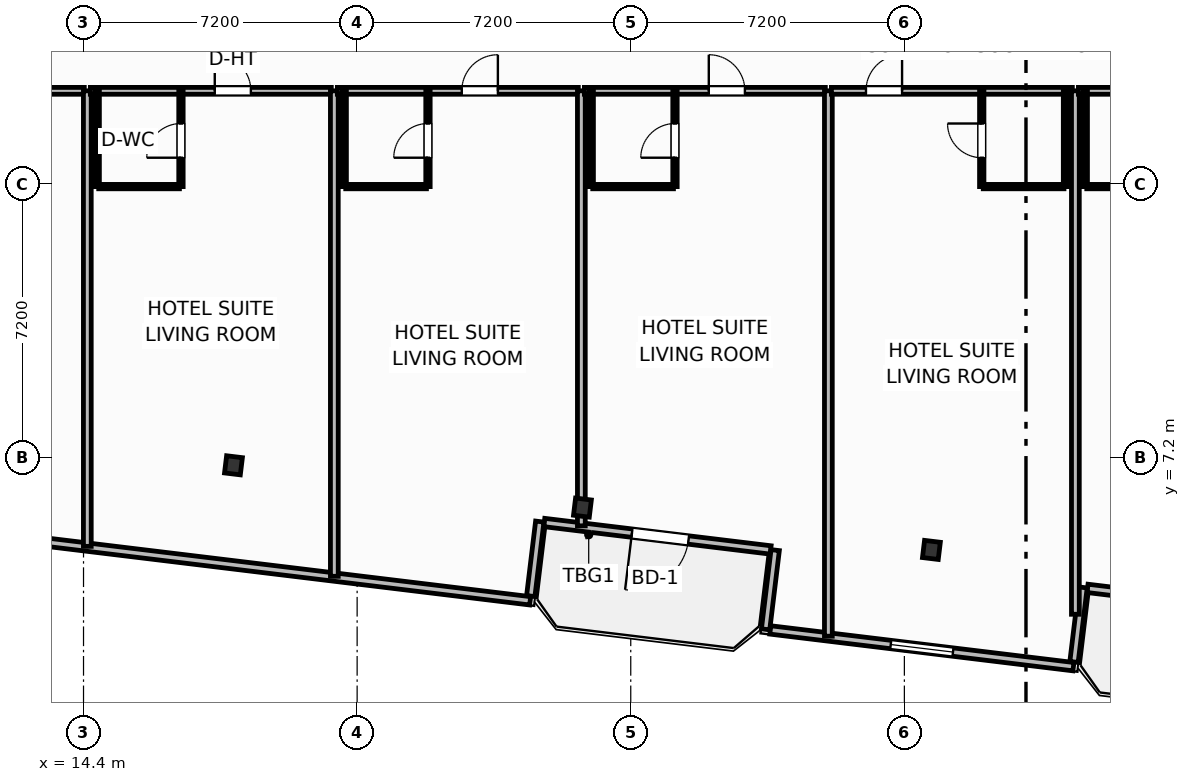
"""IFC4 building model, lengths in metres.
Left out: names, types, materials, properties, quantities, classifications, styles, units other than length and angle.
Written with IfcOpenShell. Run it as: python <this file> out.ifc"""

import sys

from ifc_helpers import new_model, si_unit, direction, frame, frame_2d, origin, origin_2d, place, context, subcontext, project, spatial, rectangle, i_section, extrude, element, fill, save


model = new_model("IFC4")
c1 = context("Model", 3, precision=1e-05, world=origin(), true_north=direction((0.0, 1.0)))
c2 = subcontext(c1, "Body", "Model", "MODEL_VIEW")
j1 = project(units=[si_unit("LENGTHUNIT", "METRE"), si_unit("PLANEANGLEUNIT", "RADIAN")], contexts=[c1])
p1 = place(None, origin())
s1 = spatial("IfcSite", under=j1, at=p1, CompositionType="ELEMENT")
p2 = place(p1, origin())
s2 = spatial("IfcBuilding", under=s1, at=p2, CompositionType="ELEMENT")
p3 = place(p2, frame((0.0, 0.0, 129.1)))
s3 = spatial("IfcBuildingStorey", under=s2, at=p3, CompositionType="ELEMENT", Elevation=129.1)
for number, where, z_axis, x_axis in (
    (1, (18.346, 6.997, 0.0), (0.0, 0.0, 1.0), (0.993, -0.12, 0.0)),
    (2, (27.529, 5.884, 0.0), (0.0, 0.0, 1.0), (0.993, -0.12, 0.0)),
    (3, (36.711, 4.77, 0.0), (0.0, 0.0, 1.0), (0.993, -0.12, 0.0)),
):
    element("IfcColumn", number, at=place(p3, frame(where, z_axis=z_axis, x_axis=x_axis)), inside=s3, PredefinedType="COLUMN", context=c2, shape_type="SweptSolid", body=[
        extrude(i_section(OverallWidth=0.418, OverallDepth=0.455, WebThickness=0.042, FlangeThickness=0.068, FilletRadius=0.025, at=origin_2d()), origin(), (0.0, 0.0, 1.0), 3.7),
    ])
p4 = place(p3, frame((32.48, 4.77, 0.0), z_axis=(0.0, 0.0, 1.0), x_axis=(-0.992735402148, 0.120318000826, 0.0)))
e4 = element("IfcWall", 4, at=p4, inside=s3, PredefinedType="SOLIDWALL", context=c2, shape_type="SweptSolid", body=[
    extrude(rectangle(XDim=6.0, YDim=0.22, at=frame_2d((3.0, 0.0))), origin(), (0.0, 0.0, 1.0), 2.73),
])
p5 = place(p4, frame((2.176, 0.0, 0.0)))
e5 = element("IfcOpeningElement", 5, at=p5, cuts=e4, PredefinedType="OPENING", context=c2, shape_type="SweptSolid", body=[
    extrude(rectangle(XDim=1.5, YDim=2.25, at=frame_2d((0.75, 1.125))), frame((0.0, 0.12, 0.0), z_axis=(0.0, -1.0, 0.0), x_axis=(1.0, 0.0, 0.0)), (0.0, 0.0, 1.0), 0.24),
])
p6 = place(p3, frame((46.776, 3.037, 0.0), z_axis=(0.0, 0.0, 1.0), x_axis=(-0.992735402148, 0.120318000826, 0.0)))
e6 = element("IfcWall", 6, at=p6, inside=s3, PredefinedType="SOLIDWALL", context=c2, shape_type="SweptSolid", body=[
    extrude(rectangle(XDim=6.0, YDim=0.22, at=frame_2d((3.0, 0.0))), origin(), (0.0, 0.0, 1.0), 2.73),
])
p7 = place(p6, frame((2.176, 0.0, 0.0)))
e7 = element("IfcOpeningElement", 7, at=p7, cuts=e6, PredefinedType="OPENING", context=c2, shape_type="SweptSolid", body=[
    extrude(rectangle(XDim=1.5, YDim=2.25, at=frame_2d((0.75, 1.125))), frame((0.0, 0.12, 0.0), z_axis=(0.0, -1.0, 0.0), x_axis=(1.0, 0.0, 0.0)), (0.0, 0.0, 1.0), 0.24),
])
p8 = place(p3, frame((4.862, 6.012, 0.0), z_axis=(0.0, 0.0, 1.0), x_axis=(0.99273213367, -0.120344965739, 0.0)))
e8 = element("IfcWall", 8, at=p8, inside=s3, PredefinedType="SOLIDWALL", context=c2, shape_type="SweptSolid", body=[
    extrude(rectangle(XDim=21.447, YDim=0.22, at=frame_2d((10.724, 0.0))), origin(), (0.0, 0.0, 1.0), 2.73),
])
p9 = place(p8, frame((5.543, 0.0, 0.8)))
e9 = element("IfcOpeningElement", 9, at=p9, cuts=e8, PredefinedType="OPENING", context=c2, shape_type="SweptSolid", body=[
    extrude(rectangle(XDim=1.65, YDim=1.65, at=frame_2d((0.825, 0.825))), frame((0.0, 0.12, 0.0), z_axis=(0.0, -1.0, 0.0), x_axis=(1.0, 0.0, 0.0)), (0.0, 0.0, 1.0), 0.24),
])
p10 = place(p3, frame((26.168, 3.555, 0.0), z_axis=(0.0, 0.0, 1.0), x_axis=(0.120290754542, 0.992738703976, 0.0)))
e10 = element("IfcWall", 10, at=p10, inside=s3, PredefinedType="SOLIDWALL", context=c2, shape_type="SweptSolid", body=[
    extrude(rectangle(XDim=1.975, YDim=0.22, at=frame_2d((0.987, 0.0))), origin(), (0.0, 0.0, 1.0), 2.73),
])
p11 = place(p3, frame((32.601, 4.765, 0.0), z_axis=(0.0, 0.0, 1.0), x_axis=(-0.120327895535, -0.992734202874, 0.0)))
e11 = element("IfcWall", 11, at=p11, inside=s3, PredefinedType="SOLIDWALL", context=c2, shape_type="SweptSolid", body=[
    extrude(rectangle(XDim=2.1, YDim=0.22, at=frame_2d((1.05, 0.0))), origin(), (0.0, 0.0, 1.0), 2.73),
])
p12 = place(p3, frame((32.472, 2.665, 0.0), z_axis=(0.0, 0.0, 1.0), x_axis=(0.992734661931, -0.120324108143, 0.0)))
e12 = element("IfcWall", 12, at=p12, inside=s3, PredefinedType="SOLIDWALL", context=c2, shape_type="SweptSolid", body=[
    extrude(rectangle(XDim=8.035, YDim=0.22, at=frame_2d((4.018, 0.0))), origin(), (0.0, 0.0, 1.0), 2.73),
])
p13 = place(p12, frame((3.192, 0.0, 0.8)))
e13 = element("IfcOpeningElement", 13, at=p13, cuts=e12, PredefinedType="OPENING", context=c2, shape_type="SweptSolid", body=[
    extrude(rectangle(XDim=1.65, YDim=1.65, at=frame_2d((0.825, 0.825))), frame((0.0, 0.12, 0.0), z_axis=(0.0, -1.0, 0.0), x_axis=(1.0, 0.0, 0.0)), (0.0, 0.0, 1.0), 0.24),
])
p14 = place(p3, frame((40.464, 1.822, 0.0), z_axis=(0.0, 0.0, 1.0), x_axis=(0.120275992932, 0.992740492538, 0.0)))
e14 = element("IfcWall", 14, at=p14, inside=s3, PredefinedType="SOLIDWALL", context=c2, shape_type="SweptSolid", body=[
    extrude(rectangle(XDim=1.975, YDim=0.22, at=frame_2d((0.988, 0.0))), origin(), (0.0, 0.0, 1.0), 2.73),
])
p15 = place(p3, frame((0.884, 16.85, 0.0), z_axis=(0.0, 0.0, 1.0), x_axis=(1.0, 0.0, 0.0)))
e15 = element("IfcWall", 15, at=p15, inside=s3, PredefinedType="PARTITIONING", context=c2, shape_type="SweptSolid", body=[
    extrude(rectangle(XDim=13.536, YDim=0.18, at=frame_2d((6.768, 0.0))), origin(), (0.0, 0.0, 1.0), 3.45),
])
p16 = place(p15, frame((11.591, 0.0, 0.0)))
e16 = element("IfcOpeningElement", 16, at=p16, cuts=e15, PredefinedType="OPENING", context=c2, shape_type="SweptSolid", body=[
    extrude(rectangle(XDim=0.95, YDim=2.05, at=frame_2d((0.475, 1.025))), frame((0.0, 0.1, 0.0), z_axis=(0.0, -1.0, 0.0), x_axis=(1.0, 0.0, 0.0)), (0.0, 0.0, 1.0), 0.2),
])
p17 = place(p3, frame((14.5, 4.864, 0.0), z_axis=(0.0, 0.0, 1.0), x_axis=(0.0, 1.0, 0.0)))
e17 = element("IfcWall", 17, at=p17, inside=s3, PredefinedType="PARTITIONING", context=c2, shape_type="SweptSolid", body=[
    extrude(rectangle(XDim=11.986, YDim=0.205, at=frame_2d((5.993, 0.0))), origin(), (0.0, 0.0, 1.0), 3.45),
])
p18 = place(p3, frame((14.58, 16.85, 0.0), z_axis=(0.0, 0.0, 1.0), x_axis=(1.0, 0.0, 0.0)))
e18 = element("IfcWall", 18, at=p18, inside=s3, PredefinedType="PARTITIONING", context=c2, shape_type="SweptSolid", body=[
    extrude(rectangle(XDim=6.34, YDim=0.18, at=frame_2d((3.17, 0.0))), origin(), (0.0, 0.0, 1.0), 3.45),
])
p19 = place(p18, frame((3.274, 0.0, 0.0)))
e19 = element("IfcOpeningElement", 19, at=p19, cuts=e18, PredefinedType="OPENING", context=c2, shape_type="SweptSolid", body=[
    extrude(rectangle(XDim=0.95, YDim=2.15, at=frame_2d((0.475, 1.075))), frame((0.0, 0.1, 0.0), z_axis=(0.0, -1.0, 0.0), x_axis=(1.0, 0.0, 0.0)), (0.0, 0.0, 1.0), 0.2),
])
p20 = place(p3, frame((14.8, 14.33, 0.0), z_axis=(0.0, 0.0, 1.0), x_axis=(1.0, 0.0, 0.0)))
e20 = element("IfcWall", 20, at=p20, inside=s3, PredefinedType="PARTITIONING", context=c2, shape_type="SweptSolid", body=[
    extrude(rectangle(XDim=2.124, YDim=0.115, at=frame_2d((1.062, 0.0))), origin(), (0.0, 0.0, 1.0), 3.45),
])
p21 = place(p3, frame((16.964, 14.33, 0.0), z_axis=(0.0, 0.0, 1.0), x_axis=(0.0, 1.0, 0.0)))
e21 = element("IfcWall", 21, at=p21, inside=s3, PredefinedType="PARTITIONING", context=c2, shape_type="SweptSolid", body=[
    extrude(rectangle(XDim=2.52, YDim=0.115, at=frame_2d((1.26, 0.0))), origin(), (0.0, 0.0, 1.0), 3.45),
])
p22 = place(p21, frame((0.76, 0.0, 0.0)))
e22 = element("IfcOpeningElement", 22, at=p22, cuts=e21, PredefinedType="OPENING", context=c2, shape_type="SweptSolid", body=[
    extrude(rectangle(XDim=0.9, YDim=2.05, at=frame_2d((0.45, 1.025))), frame((0.0, 0.067, 0.0), z_axis=(0.0, -1.0, 0.0), x_axis=(1.0, 0.0, 0.0)), (0.0, 0.0, 1.0), 0.135),
])
p23 = place(p3, frame((14.76, 14.33, 0.0), z_axis=(0.0, 0.0, 1.0), x_axis=(0.0, 1.0, 0.0)))
e23 = element("IfcWall", 23, at=p23, inside=s3, PredefinedType="PARTITIONING", context=c2, shape_type="SweptSolid", body=[
    extrude(rectangle(XDim=2.52, YDim=0.115, at=frame_2d((1.26, 0.0))), origin(), (0.0, 0.0, 1.0), 3.45),
])
p24 = place(p3, frame((21.0, 4.076, 0.0), z_axis=(0.0, 0.0, 1.0), x_axis=(0.0, 1.0, 0.0)))
e24 = element("IfcWall", 24, at=p24, inside=s3, PredefinedType="PARTITIONING", context=c2, shape_type="SweptSolid", body=[
    extrude(rectangle(XDim=12.774, YDim=0.205, at=frame_2d((6.387, 0.0))), origin(), (0.0, 0.0, 1.0), 3.45),
])
p25 = place(p3, frame((21.08, 16.85, 0.0), z_axis=(0.0, 0.0, 1.0), x_axis=(1.0, 0.0, 0.0)))
e25 = element("IfcWall", 25, at=p25, inside=s3, PredefinedType="PARTITIONING", context=c2, shape_type="SweptSolid", body=[
    extrude(rectangle(XDim=6.34, YDim=0.18, at=frame_2d((3.17, 0.0))), origin(), (0.0, 0.0, 1.0), 3.45),
])
p26 = place(p25, frame((3.274, 0.0, 0.0)))
e26 = element("IfcOpeningElement", 26, at=p26, cuts=e25, PredefinedType="OPENING", context=c2, shape_type="SweptSolid", body=[
    extrude(rectangle(XDim=0.95, YDim=2.15, at=frame_2d((0.475, 1.075))), frame((0.0, 0.1, 0.0), z_axis=(0.0, -1.0, 0.0), x_axis=(1.0, 0.0, 0.0)), (0.0, 0.0, 1.0), 0.2),
])
p27 = place(p3, frame((21.3, 14.33, 0.0), z_axis=(0.0, 0.0, 1.0), x_axis=(1.0, 0.0, 0.0)))
e27 = element("IfcWall", 27, at=p27, inside=s3, PredefinedType="PARTITIONING", context=c2, shape_type="SweptSolid", body=[
    extrude(rectangle(XDim=2.124, YDim=0.115, at=frame_2d((1.062, 0.0))), origin(), (0.0, 0.0, 1.0), 3.45),
])
p28 = place(p3, frame((23.464, 14.33, 0.0), z_axis=(0.0, 0.0, 1.0), x_axis=(0.0, 1.0, 0.0)))
e28 = element("IfcWall", 28, at=p28, inside=s3, PredefinedType="PARTITIONING", context=c2, shape_type="SweptSolid", body=[
    extrude(rectangle(XDim=2.52, YDim=0.115, at=frame_2d((1.26, 0.0))), origin(), (0.0, 0.0, 1.0), 3.45),
])
p29 = place(p28, frame((0.76, 0.0, 0.0)))
e29 = element("IfcOpeningElement", 29, at=p29, cuts=e28, PredefinedType="OPENING", context=c2, shape_type="SweptSolid", body=[
    extrude(rectangle(XDim=0.9, YDim=2.05, at=frame_2d((0.45, 1.025))), frame((0.0, 0.067, 0.0), z_axis=(0.0, -1.0, 0.0), x_axis=(1.0, 0.0, 0.0)), (0.0, 0.0, 1.0), 0.135),
])
p30 = place(p3, frame((21.26, 14.33, 0.0), z_axis=(0.0, 0.0, 1.0), x_axis=(0.0, 1.0, 0.0)))
e30 = element("IfcWall", 30, at=p30, inside=s3, PredefinedType="PARTITIONING", context=c2, shape_type="SweptSolid", body=[
    extrude(rectangle(XDim=2.52, YDim=0.115, at=frame_2d((1.26, 0.0))), origin(), (0.0, 0.0, 1.0), 3.45),
])
p31 = place(p3, frame((27.5, 5.403, 0.0), z_axis=(0.0, 0.0, 1.0), x_axis=(0.0, 1.0, 0.0)))
e31 = element("IfcWall", 31, at=p31, inside=s3, PredefinedType="PARTITIONING", context=c2, shape_type="SweptSolid", body=[
    extrude(rectangle(XDim=11.447, YDim=0.205, at=frame_2d((5.723, 0.0))), origin(), (0.0, 0.0, 1.0), 2.662),
])
p32 = place(p3, frame((27.58, 16.85, 0.0), z_axis=(0.0, 0.0, 1.0), x_axis=(1.0, 0.0, 0.0)))
e32 = element("IfcWall", 32, at=p32, inside=s3, PredefinedType="PARTITIONING", context=c2, shape_type="SweptSolid", body=[
    extrude(rectangle(XDim=6.34, YDim=0.18, at=frame_2d((3.17, 0.0))), origin(), (0.0, 0.0, 1.0), 3.45),
])
p33 = place(p32, frame((3.274, 0.0, 0.0)))
e33 = element("IfcOpeningElement", 33, at=p33, cuts=e32, PredefinedType="OPENING", context=c2, shape_type="SweptSolid", body=[
    extrude(rectangle(XDim=0.95, YDim=2.15, at=frame_2d((0.475, 1.075))), frame((0.0, 0.1, 0.0), z_axis=(0.0, -1.0, 0.0), x_axis=(1.0, 0.0, 0.0)), (0.0, 0.0, 1.0), 0.2),
])
p34 = place(p3, frame((27.8, 14.33, 0.0), z_axis=(0.0, 0.0, 1.0), x_axis=(1.0, 0.0, 0.0)))
e34 = element("IfcWall", 34, at=p34, inside=s3, PredefinedType="PARTITIONING", context=c2, shape_type="SweptSolid", body=[
    extrude(rectangle(XDim=2.124, YDim=0.115, at=frame_2d((1.062, 0.0))), origin(), (0.0, 0.0, 1.0), 3.45),
])
p35 = place(p3, frame((29.964, 14.33, 0.0), z_axis=(0.0, 0.0, 1.0), x_axis=(0.0, 1.0, 0.0)))
e35 = element("IfcWall", 35, at=p35, inside=s3, PredefinedType="PARTITIONING", context=c2, shape_type="SweptSolid", body=[
    extrude(rectangle(XDim=2.52, YDim=0.115, at=frame_2d((1.26, 0.0))), origin(), (0.0, 0.0, 1.0), 3.45),
])
p36 = place(p35, frame((0.76, 0.0, 0.0)))
e36 = element("IfcOpeningElement", 36, at=p36, cuts=e35, PredefinedType="OPENING", context=c2, shape_type="SweptSolid", body=[
    extrude(rectangle(XDim=0.9, YDim=2.05, at=frame_2d((0.45, 1.025))), frame((0.0, 0.067, 0.0), z_axis=(0.0, -1.0, 0.0), x_axis=(1.0, 0.0, 0.0)), (0.0, 0.0, 1.0), 0.135),
])
p37 = place(p3, frame((27.76, 14.33, 0.0), z_axis=(0.0, 0.0, 1.0), x_axis=(0.0, 1.0, 0.0)))
e37 = element("IfcWall", 37, at=p37, inside=s3, PredefinedType="PARTITIONING", context=c2, shape_type="SweptSolid", body=[
    extrude(rectangle(XDim=2.52, YDim=0.115, at=frame_2d((1.26, 0.0))), origin(), (0.0, 0.0, 1.0), 3.45),
])
p38 = place(p3, frame((34.0, 2.5, 0.0), z_axis=(0.0, 0.0, 1.0), x_axis=(0.0, 1.0, 0.0)))
e38 = element("IfcWall", 38, at=p38, inside=s3, PredefinedType="PARTITIONING", context=c2, shape_type="SweptSolid", body=[
    extrude(rectangle(XDim=14.35, YDim=0.205, at=frame_2d((7.175, 0.0))), origin(), (0.0, 0.0, 1.0), 3.45),
])
p39 = place(p3, frame((34.08, 16.85, 0.0), z_axis=(0.0, 0.0, 1.0), x_axis=(1.0, 0.0, 0.0)))
e39 = element("IfcWall", 39, at=p39, inside=s3, PredefinedType="PARTITIONING", context=c2, shape_type="SweptSolid", body=[
    extrude(rectangle(XDim=6.34, YDim=0.18, at=frame_2d((3.17, 0.0))), origin(), (0.0, 0.0, 1.0), 3.45),
])
p40 = place(p39, frame((0.91, 0.0, 0.0)))
e40 = element("IfcOpeningElement", 40, at=p40, cuts=e39, PredefinedType="OPENING", context=c2, shape_type="SweptSolid", body=[
    extrude(rectangle(XDim=0.95, YDim=2.15, at=frame_2d((0.475, 1.075))), frame((0.0, 0.1, 0.0), z_axis=(0.0, -1.0, 0.0), x_axis=(1.0, 0.0, 0.0)), (0.0, 0.0, 1.0), 0.2),
])
p41 = place(p3, frame((38.076, 14.33, 0.0), z_axis=(0.0, 0.0, 1.0), x_axis=(1.0, 0.0, 0.0)))
e41 = element("IfcWall", 41, at=p41, inside=s3, PredefinedType="PARTITIONING", context=c2, shape_type="SweptSolid", body=[
    extrude(rectangle(XDim=2.124, YDim=0.115, at=frame_2d((1.062, 0.0))), origin(), (0.0, 0.0, 1.0), 3.45),
])
p42 = place(p3, frame((38.036, 14.33, 0.0), z_axis=(0.0, 0.0, 1.0), x_axis=(0.0, 1.0, 0.0)))
e42 = element("IfcWall", 42, at=p42, inside=s3, PredefinedType="PARTITIONING", context=c2, shape_type="SweptSolid", body=[
    extrude(rectangle(XDim=2.52, YDim=0.115, at=frame_2d((1.26, 0.0))), origin(), (0.0, 0.0, 1.0), 3.45),
])
p43 = place(p42, frame((0.76, 0.0, 0.0)))
e43 = element("IfcOpeningElement", 43, at=p43, cuts=e42, PredefinedType="OPENING", context=c2, shape_type="SweptSolid", body=[
    extrude(rectangle(XDim=0.9, YDim=2.05, at=frame_2d((0.45, 1.025))), frame((0.0, 0.067, 0.0), z_axis=(0.0, -1.0, 0.0), x_axis=(1.0, 0.0, 0.0)), (0.0, 0.0, 1.0), 0.135),
])
p44 = place(p3, frame((40.24, 14.33, 0.0), z_axis=(0.0, 0.0, 1.0), x_axis=(0.0, 1.0, 0.0)))
e44 = element("IfcWall", 44, at=p44, inside=s3, PredefinedType="PARTITIONING", context=c2, shape_type="SweptSolid", body=[
    extrude(rectangle(XDim=2.52, YDim=0.115, at=frame_2d((1.26, 0.0))), origin(), (0.0, 0.0, 1.0), 3.45),
])
p45 = place(p3, frame((40.5, 3.077, 0.0), z_axis=(0.0, 0.0, 1.0), x_axis=(0.0, 1.0, 0.0)))
e45 = element("IfcWall", 45, at=p45, inside=s3, PredefinedType="PARTITIONING", context=c2, shape_type="SweptSolid", body=[
    extrude(rectangle(XDim=13.773, YDim=0.205, at=frame_2d((6.887, 0.0))), origin(), (0.0, 0.0, 1.0), 3.45),
])
p46 = place(p3, frame((40.58, 16.85, 0.0), z_axis=(0.0, 0.0, 1.0), x_axis=(1.0, 0.0, 0.0)))
e46 = element("IfcWall", 46, at=p46, inside=s3, PredefinedType="PARTITIONING", context=c2, shape_type="SweptSolid", body=[
    extrude(rectangle(XDim=6.34, YDim=0.18, at=frame_2d((3.17, 0.0))), origin(), (0.0, 0.0, 1.0), 3.45),
])
p47 = place(p46, frame((3.274, 0.0, 0.0)))
e47 = element("IfcOpeningElement", 47, at=p47, cuts=e46, PredefinedType="OPENING", context=c2, shape_type="SweptSolid", body=[
    extrude(rectangle(XDim=0.95, YDim=2.15, at=frame_2d((0.475, 1.075))), frame((0.0, 0.1, 0.0), z_axis=(0.0, -1.0, 0.0), x_axis=(1.0, 0.0, 0.0)), (0.0, 0.0, 1.0), 0.2),
])
p48 = place(p3, frame((40.8, 14.33, 0.0), z_axis=(0.0, 0.0, 1.0), x_axis=(1.0, 0.0, 0.0)))
e48 = element("IfcWall", 48, at=p48, inside=s3, PredefinedType="PARTITIONING", context=c2, shape_type="SweptSolid", body=[
    extrude(rectangle(XDim=2.124, YDim=0.115, at=frame_2d((1.062, 0.0))), origin(), (0.0, 0.0, 1.0), 3.45),
])
p49 = place(p3, frame((40.76, 14.33, 0.0), z_axis=(0.0, 0.0, 1.0), x_axis=(0.0, 1.0, 0.0)))
e49 = element("IfcWall", 49, at=p49, inside=s3, PredefinedType="PARTITIONING", context=c2, shape_type="SweptSolid", body=[
    extrude(rectangle(XDim=2.52, YDim=0.115, at=frame_2d((1.26, 0.0))), origin(), (0.0, 0.0, 1.0), 3.45),
])
p50 = place(p5, origin())
e50 = element("IfcDoor", 50, at=p50, inside=s3, OperationType="SINGLE_SWING_RIGHT", PredefinedType="DOOR", context=c2, shape_type="SweptSolid", body=[
    extrude(rectangle(XDim=1.5, YDim=2.25, at=frame_2d((0.75, 1.125))), frame((0.0, 0.025, 0.0), z_axis=(0.0, -1.0, 0.0), x_axis=(1.0, 0.0, 0.0)), (0.0, 0.0, 1.0), 0.05),
])
fill(e5, e50)
p51 = place(p13, origin())
e51 = element("IfcWindow", 51, at=p51, inside=s3, PartitioningType="SINGLE_PANEL", PredefinedType="WINDOW", context=c2, shape_type="SweptSolid", body=[
    extrude(rectangle(XDim=1.65, YDim=1.65, at=frame_2d((0.825, 0.825))), frame((0.0, 0.03, 0.0), z_axis=(0.0, -1.0, 0.0), x_axis=(1.0, 0.0, 0.0)), (0.0, 0.0, 1.0), 0.06),
])
fill(e13, e51)
p52 = place(p19, origin())
e52 = element("IfcDoor", 52, at=p52, inside=s3, OperationType="SINGLE_SWING_LEFT", PredefinedType="DOOR", context=c2, shape_type="SweptSolid", body=[
    extrude(rectangle(XDim=0.95, YDim=2.15, at=frame_2d((0.475, 1.075))), frame((0.0, 0.025, 0.0), z_axis=(0.0, -1.0, 0.0), x_axis=(1.0, 0.0, 0.0)), (0.0, 0.0, 1.0), 0.05),
])
fill(e19, e52)
p53 = place(p22, origin())
e53 = element("IfcDoor", 53, at=p53, inside=s3, OperationType="SINGLE_SWING_LEFT", PredefinedType="DOOR", context=c2, shape_type="SweptSolid", body=[
    extrude(rectangle(XDim=0.9, YDim=2.05, at=frame_2d((0.45, 1.025))), frame((0.0, 0.025, 0.0), z_axis=(0.0, -1.0, 0.0), x_axis=(1.0, 0.0, 0.0)), (0.0, 0.0, 1.0), 0.05),
])
fill(e22, e53)
p54 = place(p26, origin())
e54 = element("IfcDoor", 54, at=p54, inside=s3, OperationType="SINGLE_SWING_RIGHT", PredefinedType="DOOR", context=c2, shape_type="SweptSolid", body=[
    extrude(rectangle(XDim=0.95, YDim=2.15, at=frame_2d((0.475, 1.075))), frame((0.0, 0.025, 0.0), z_axis=(0.0, -1.0, 0.0), x_axis=(1.0, 0.0, 0.0)), (0.0, 0.0, 1.0), 0.05),
])
fill(e26, e54)
p55 = place(p29, origin())
e55 = element("IfcDoor", 55, at=p55, inside=s3, OperationType="SINGLE_SWING_LEFT", PredefinedType="DOOR", context=c2, shape_type="SweptSolid", body=[
    extrude(rectangle(XDim=0.9, YDim=2.05, at=frame_2d((0.45, 1.025))), frame((0.0, 0.025, 0.0), z_axis=(0.0, -1.0, 0.0), x_axis=(1.0, 0.0, 0.0)), (0.0, 0.0, 1.0), 0.05),
])
fill(e29, e55)
p56 = place(p33, origin())
e56 = element("IfcDoor", 56, at=p56, inside=s3, OperationType="SINGLE_SWING_LEFT", PredefinedType="DOOR", context=c2, shape_type="SweptSolid", body=[
    extrude(rectangle(XDim=0.95, YDim=2.15, at=frame_2d((0.475, 1.075))), frame((0.0, 0.025, 0.0), z_axis=(0.0, -1.0, 0.0), x_axis=(1.0, 0.0, 0.0)), (0.0, 0.0, 1.0), 0.05),
])
fill(e33, e56)
p57 = place(p36, origin())
e57 = element("IfcDoor", 57, at=p57, inside=s3, OperationType="SINGLE_SWING_LEFT", PredefinedType="DOOR", context=c2, shape_type="SweptSolid", body=[
    extrude(rectangle(XDim=0.9, YDim=2.05, at=frame_2d((0.45, 1.025))), frame((0.0, 0.025, 0.0), z_axis=(0.0, -1.0, 0.0), x_axis=(1.0, 0.0, 0.0)), (0.0, 0.0, 1.0), 0.05),
])
fill(e36, e57)
p58 = place(p40, origin())
e58 = element("IfcDoor", 58, at=p58, inside=s3, OperationType="SINGLE_SWING_RIGHT", PredefinedType="DOOR", context=c2, shape_type="SweptSolid", body=[
    extrude(rectangle(XDim=0.95, YDim=2.15, at=frame_2d((0.475, 1.075))), frame((0.0, 0.025, 0.0), z_axis=(0.0, -1.0, 0.0), x_axis=(1.0, 0.0, 0.0)), (0.0, 0.0, 1.0), 0.05),
])
fill(e40, e58)
p59 = place(p43, origin())
e59 = element("IfcDoor", 59, at=p59, inside=s3, OperationType="SINGLE_SWING_RIGHT", PredefinedType="DOOR", context=c2, shape_type="SweptSolid", body=[
    extrude(rectangle(XDim=0.9, YDim=2.05, at=frame_2d((0.45, 1.025))), frame((0.0, 0.025, 0.0), z_axis=(0.0, -1.0, 0.0), x_axis=(1.0, 0.0, 0.0)), (0.0, 0.0, 1.0), 0.05),
])
fill(e43, e59)
save(model, sys.argv[1])
